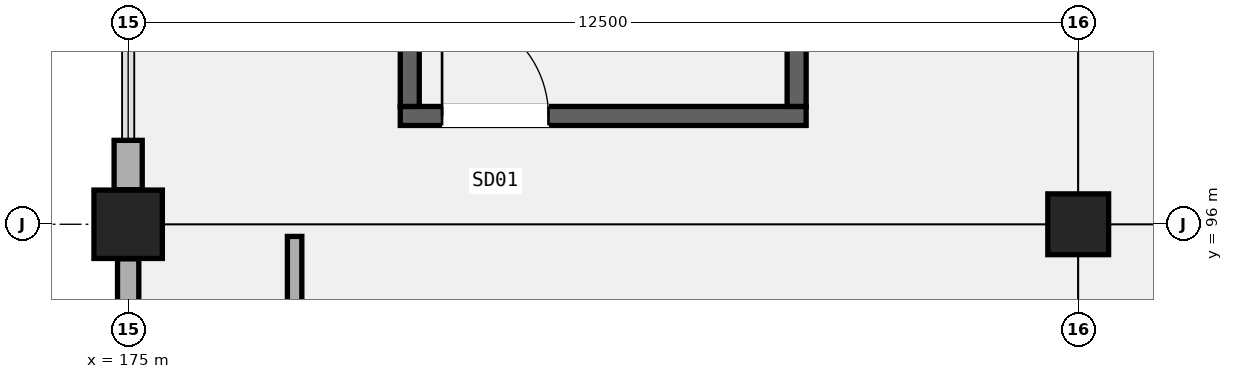
"""IFC4 building model, lengths in metres.
Left out: names, types, materials, properties, quantities, classifications, styles, units other than length and angle.
Written with IfcOpenShell. Run it as: python <this file> out.ifc"""

import sys

from ifc_helpers import new_model, si_unit, direction, frame, frame_2d, origin, origin_2d, place, context, subcontext, project, spatial, rectangle, extrude, element, fill, save


model = new_model("IFC4")
c1 = context("Model", 3, precision=1e-05, world=origin(), true_north=direction((0.0, 1.0)))
c2 = subcontext(c1, "Body", "Model", "MODEL_VIEW")
j1 = project(units=[si_unit("LENGTHUNIT", "METRE"), si_unit("PLANEANGLEUNIT", "RADIAN")], contexts=[c1])
p1 = place(None, origin())
s1 = spatial("IfcSite", under=j1, at=p1, CompositionType="ELEMENT")
p2 = place(p1, origin())
s2 = spatial("IfcBuilding", under=s1, at=p2, CompositionType="ELEMENT")
p3 = place(p2, frame((0.0, 0.0, 10.2)))
s3 = spatial("IfcBuildingStorey", under=s2, at=p3, CompositionType="ELEMENT", Elevation=10.2)
p4 = place(p3, frame((175.0, 96.0, 0.0), z_axis=(0.0, 0.0, 1.0), x_axis=(1.0, 0.0, 0.0)))
e1 = element("IfcColumn", 1, at=p4, inside=s3, PredefinedType="COLUMN", context=c2, shape_type="SweptSolid", body=[
    extrude(rectangle(XDim=0.9, YDim=0.9, at=origin_2d()), origin(), (0.0, 0.0, 1.0), 5.1),
])
p5 = place(p3, frame((187.5, 96.0, 0.0), z_axis=(0.0, 0.0, 1.0), x_axis=(1.0, 0.0, 0.0)))
e2 = element("IfcColumn", 2, at=p5, inside=s3, PredefinedType="COLUMN", context=c2, shape_type="SweptSolid", body=[
    extrude(rectangle(XDim=0.8, YDim=0.8, at=origin_2d()), origin(), (0.0, 0.0, 1.0), 5.1),
])
p6 = place(p3, frame((175.0, 84.504, 0.0), z_axis=(0.0, 0.0, 1.0), x_axis=(0.0, 1.0, 0.0)))
e3 = element("IfcWall", 3, at=p6, inside=s3, PredefinedType="SOLIDWALL", context=c2, shape_type="SweptSolid", body=[
    extrude(rectangle(XDim=11.042, YDim=0.28, at=frame_2d((5.521, 0.0))), origin(), (0.0, 0.0, 1.0), 4.02),
])
p7 = place(p6, frame((1.5, 0.0, 0.95)))
e4 = element("IfcOpeningElement", 4, at=p7, cuts=e3, PredefinedType="OPENING", context=c2, shape_type="SweptSolid", body=[
    extrude(rectangle(XDim=0.9, YDim=2.4, at=frame_2d((0.45, 1.2))), frame((0.0, 0.15, 0.0), z_axis=(0.0, -1.0, 0.0), x_axis=(1.0, 0.0, 0.0)), (0.0, 0.0, 1.0), 0.3),
])
p8 = place(p3, frame((175.0, 96.454, 0.0), z_axis=(0.0, 0.0, 1.0), x_axis=(0.0, 1.0, 0.0)))
e5 = element("IfcWall", 5, at=p8, inside=s3, PredefinedType="SOLIDWALL", context=c2, shape_type="SweptSolid", body=[
    extrude(rectangle(XDim=0.65, YDim=0.37, at=frame_2d((0.325, 0.0))), origin(), (0.0, 0.0, 1.0), 4.12),
])
p9 = place(p3, frame((178.58, 97.425, 0.0), z_axis=(0.0, 0.0, 1.0), x_axis=(1.0, 0.0, 0.0)))
e6 = element("IfcWall", 6, at=p9, inside=s3, PredefinedType="SHEAR", context=c2, shape_type="SweptSolid", body=[
    extrude(rectangle(XDim=5.34, YDim=0.25, at=frame_2d((2.67, 0.0))), origin(), (0.0, 0.0, 1.0), 4.82),
])
p10 = place(p9, frame((0.55, 0.0, 0.0)))
e7 = element("IfcOpeningElement", 7, at=p10, cuts=e6, PredefinedType="OPENING", context=c2, shape_type="SweptSolid", body=[
    extrude(rectangle(XDim=1.4, YDim=2.15, at=frame_2d((0.7, 1.075))), frame((0.0, 0.135, 0.0), z_axis=(0.0, -1.0, 0.0), x_axis=(1.0, 0.0, 0.0)), (0.0, 0.0, 1.0), 0.27),
])
for number, where, z_axis, x_axis in (
    (8, (178.705, 97.55, 0.0), (0.0, 0.0, 1.0), (0.0, 1.0, 0.0)),
    (9, (183.795, 97.55, 0.0), (0.0, 0.0, 1.0), (0.0, 1.0, 0.0)),
):
    element("IfcWall", number, at=place(p3, frame(where, z_axis=z_axis, x_axis=x_axis)), inside=s3, PredefinedType="SHEAR", context=c2, shape_type="SweptSolid", body=[
        extrude(rectangle(XDim=8.9, YDim=0.25, at=frame_2d((4.45, 0.0))), origin(), (0.0, 0.0, 1.0), 4.82),
    ])
p11 = place(p3, frame((177.19, 84.16, 0.0), z_axis=(0.0, 0.0, 1.0), x_axis=(0.0, 1.0, 0.0)))
e10 = element("IfcWall", 10, at=p11, inside=s3, PredefinedType="PARTITIONING", context=c2, shape_type="SweptSolid", body=[
    extrude(rectangle(XDim=11.68, YDim=0.19, at=frame_2d((5.84, 0.0))), origin(), (0.0, 0.0, 1.0), 4.22),
])
p12 = place(p11, frame((3.485, 0.0, 0.0), z_axis=(0.0, 0.0, 1.0), x_axis=(-1.0, 0.0, 0.0)))
e11 = element("IfcOpeningElement", 11, at=p12, cuts=e10, PredefinedType="OPENING", context=c2, shape_type="SweptSolid", body=[
    extrude(rectangle(XDim=1.56, YDim=2.26, at=frame_2d((0.78, 1.13))), frame((0.0, 0.105, 0.0), z_axis=(0.0, -1.0, 0.0), x_axis=(1.0, 0.0, 0.0)), (0.0, 0.0, 1.0), 0.21),
])
p13 = place(p11, frame((9.425, 0.0, 0.0), z_axis=(0.0, 0.0, 1.0), x_axis=(-1.0, 0.0, 0.0)))
e12 = element("IfcOpeningElement", 12, at=p13, cuts=e10, PredefinedType="OPENING", context=c2, shape_type="SweptSolid", body=[
    extrude(rectangle(XDim=1.6, YDim=2.3, at=frame_2d((0.8, 1.15))), frame((0.0, 0.105, 0.0), z_axis=(0.0, -1.0, 0.0), x_axis=(1.0, 0.0, 0.0)), (0.0, 0.0, 1.0), 0.21),
])
p14 = place(p10, origin())
e13 = element("IfcDoor", 13, at=p14, inside=s3, OperationType="SINGLE_SWING_LEFT", PredefinedType="DOOR", context=c2, shape_type="SweptSolid", body=[
    extrude(rectangle(XDim=1.4, YDim=2.15, at=frame_2d((0.7, 1.075))), frame((0.0, 0.025, 0.0), z_axis=(0.0, -1.0, 0.0), x_axis=(1.0, 0.0, 0.0)), (0.0, 0.0, 1.0), 0.05),
])
fill(e7, e13)
save(model, sys.argv[1])
